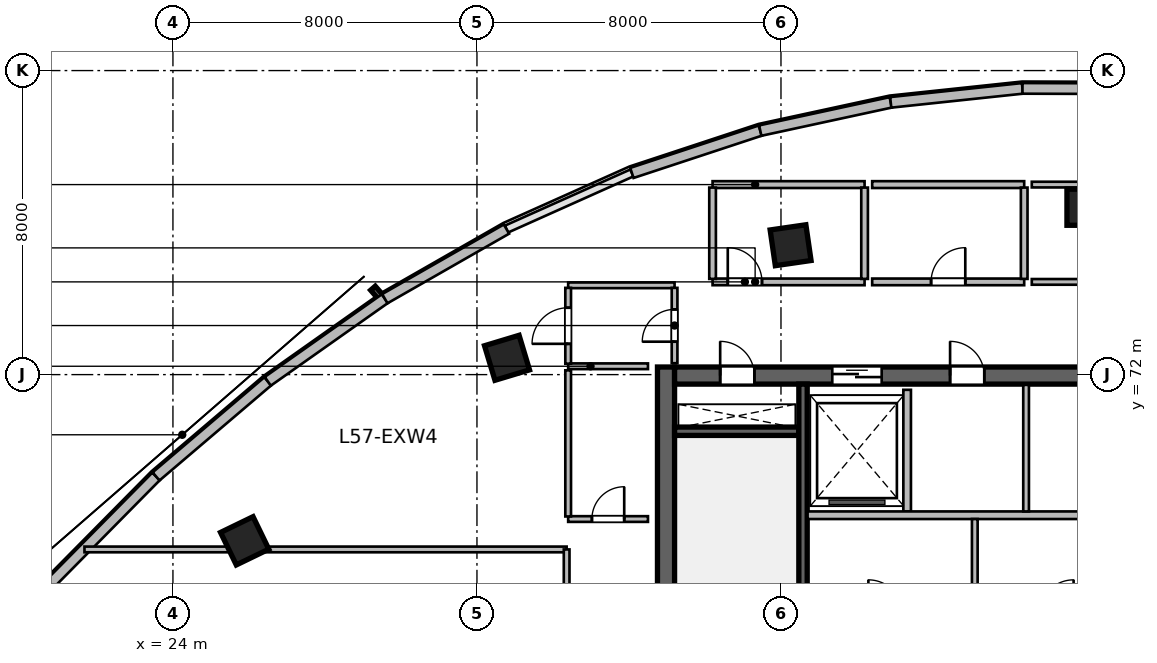
"""IFC4 building model, lengths in metres.
Left out: names, types, materials, properties, quantities, classifications, styles, units other than length and angle.
Written with IfcOpenShell. Run it as: python <this file> out.ifc"""

import sys

from ifc_helpers import new_model, si_unit, direction, frame, frame_2d, origin, origin_2d, place, context, subcontext, project, spatial, rectangle, extrude, source, transform, mapped, element, fill, save


model = new_model("IFC4")
c1 = context("Model", 3, precision=1e-05, world=origin(), true_north=direction((0.0, 1.0)))
c2 = subcontext(c1, "Body", "Model", "MODEL_VIEW")
j1 = project(units=[si_unit("LENGTHUNIT", "METRE"), si_unit("PLANEANGLEUNIT", "RADIAN")], contexts=[c1])
p1 = place(None, origin())
s1 = spatial("IfcSite", under=j1, at=p1, CompositionType="ELEMENT")
p2 = place(p1, origin())
s2 = spatial("IfcBuilding", under=s1, at=p2, CompositionType="ELEMENT")
p3 = place(p2, frame((0.0, 0.0, 235.2)))
s3 = spatial("IfcBuildingStorey", under=s2, at=p3, CompositionType="ELEMENT", Elevation=235.2)
m1 = source(origin(), c2, "Body", "SweptSolid", [
    extrude(rectangle(XDim=12.0, YDim=0.45, at=frame_2d((6.0, 0.0))), origin(), (0.0, 0.0, 1.0), 3.9),
])
p4 = place(p3, frame((36.975, 60.2, 0.0), z_axis=(0.0, 0.0, 1.0), x_axis=(0.0, 1.0, 0.0)))
e1 = element("IfcWall", 1, at=p4, inside=s3, PredefinedType="SHEAR", context=c2, shape_type="MappedRepresentation", body=[
    mapped(m1, transform((0.0, 0.0, 0.0), scale=1.0)),
])
m2 = source(origin(), c2, "Body", "SweptSolid", [
    extrude(rectangle(XDim=21.6, YDim=0.45, at=frame_2d((10.8, 0.0))), origin(), (0.0, 0.0, 1.0), 3.9),
])
p5 = place(p3, frame((37.2, 71.975, 0.0), z_axis=(0.0, 0.0, 1.0), x_axis=(1.0, 0.0, 0.0)))
e2 = element("IfcWall", 2, at=p5, inside=s3, PredefinedType="SHEAR", context=c2, shape_type="MappedRepresentation", body=[
    mapped(m2, transform((0.0, 0.0, 0.0), scale=1.0)),
])
p6 = place(p5, frame((1.2, 0.0, 0.0)))
e3 = element("IfcOpeningElement", 3, at=p6, cuts=e2, PredefinedType="OPENING", context=c2, shape_type="SweptSolid", body=[
    extrude(rectangle(XDim=0.9, YDim=2.1, at=frame_2d((0.45, 1.05))), frame((0.0, 0.235, 0.0), z_axis=(0.0, -1.0, 0.0), x_axis=(1.0, 0.0, 0.0)), (0.0, 0.0, 1.0), 0.47),
])
p7 = place(p5, frame((14.7, 0.0, 0.0)))
e4 = element("IfcOpeningElement", 4, at=p7, cuts=e2, PredefinedType="OPENING", context=c2, shape_type="SweptSolid", body=[
    extrude(rectangle(XDim=1.2, YDim=2.15, at=frame_2d((0.6, 1.075))), frame((0.0, 0.235, 0.0), z_axis=(0.0, -1.0, 0.0), x_axis=(1.0, 0.0, 0.0)), (0.0, 0.0, 1.0), 0.47),
])
p8 = place(p5, frame((4.15, 0.0, 0.0)))
e5 = element("IfcOpeningElement", 5, at=p8, cuts=e2, PredefinedType="OPENING", context=c2, shape_type="SweptSolid", body=[
    extrude(rectangle(XDim=1.3, YDim=2.15, at=frame_2d((0.65, 1.075))), frame((0.0, 0.235, 0.0), z_axis=(0.0, -1.0, 0.0), x_axis=(1.0, 0.0, 0.0)), (0.0, 0.0, 1.0), 0.47),
])
p9 = place(p5, frame((7.25, 0.0, 0.0)))
e6 = element("IfcOpeningElement", 6, at=p9, cuts=e2, PredefinedType="OPENING", context=c2, shape_type="SweptSolid", body=[
    extrude(rectangle(XDim=0.9, YDim=2.1, at=frame_2d((0.45, 1.05))), frame((0.0, 0.235, 0.0), z_axis=(0.0, -1.0, 0.0), x_axis=(1.0, 0.0, 0.0)), (0.0, 0.0, 1.0), 0.47),
])
p10 = place(p5, frame((10.95, 0.0, 0.0)))
e7 = element("IfcOpeningElement", 7, at=p10, cuts=e2, PredefinedType="OPENING", context=c2, shape_type="SweptSolid", body=[
    extrude(rectangle(XDim=0.9, YDim=2.1, at=frame_2d((0.45, 1.05))), frame((0.0, 0.235, 0.0), z_axis=(0.0, -1.0, 0.0), x_axis=(1.0, 0.0, 0.0)), (0.0, 0.0, 1.0), 0.47),
])
m3 = source(origin(), c2, "Body", "SweptSolid", [
    extrude(rectangle(XDim=3.27, YDim=0.22, at=frame_2d((1.635, 0.0))), origin(), (0.0, 0.0, 1.0), 3.9),
])
p11 = place(p3, frame((37.2, 70.51, 0.0), z_axis=(0.0, 0.0, 1.0), x_axis=(1.0, 0.0, 0.0)))
e8 = element("IfcWall", 8, at=p11, inside=s3, PredefinedType="SHEAR", context=c2, shape_type="MappedRepresentation", body=[
    mapped(m3, transform((0.0, 0.0, 0.0), scale=1.0)),
])
m4 = source(origin(), c2, "Body", "SweptSolid", [
    extrude(rectangle(XDim=11.1, YDim=0.22, at=frame_2d((5.55, 0.0))), origin(), (0.0, 0.0, 1.0), 3.9),
])
p12 = place(p3, frame((40.58, 60.65, 0.0), z_axis=(0.0, 0.0, 1.0), x_axis=(0.0, 1.0, 0.0)))
e9 = element("IfcWall", 9, at=p12, inside=s3, PredefinedType="SHEAR", context=c2, shape_type="MappedRepresentation", body=[
    mapped(m4, transform((0.0, 0.0, 0.0), scale=1.0)),
])
m5 = source(origin(), c2, "Body", "SweptSolid", [
    extrude(rectangle(XDim=0.95, YDim=0.95, at=origin_2d()), origin(), (0.0, 0.0, 1.0), 3.9),
])
for number, where, z_axis, x_axis in (
    (10, (25.888, 67.627, 0.0), (0.0, 0.0, 1.0), (-0.436, 0.9, 0.0)),
    (11, (32.791, 72.442, 0.0), (0.0, 0.0, 1.0), (-0.289, 0.957, 0.0)),
    (12, (40.253, 75.404, 0.0), (0.0, 0.0, 1.0), (-0.143, 0.99, 0.0)),
    (13, (48.0, 76.404, 0.0), (0.0, 0.0, 1.0), (0.0, 1.0, 0.0)),
):
    element("IfcColumn", number, at=place(p3, frame(where, z_axis=z_axis, x_axis=x_axis)), inside=s3, PredefinedType="COLUMN", context=c2, shape_type="MappedRepresentation", body=[
        mapped(m5, transform((0.0, 0.0, 0.0), scale=1.0)),
    ])
m6 = source(origin(), c2, "Body", "SweptSolid", [
    extrude(rectangle(XDim=3.955, YDim=0.28, at=frame_2d((1.978, 0.0))), origin(), (0.0, 0.0, 1.0), 3.65),
])
p13 = place(p3, frame((20.776, 66.507, 0.0), z_axis=(0.0, 0.0, 1.0), x_axis=(0.702710517474, 0.711475880569, 0.0)))
e14 = element("IfcWall", 14, at=p13, inside=s3, PredefinedType="SOLIDWALL", context=c2, shape_type="MappedRepresentation", body=[
    mapped(m6, transform((0.0, 0.0, 0.0), scale=1.0)),
])
m7 = source(origin(), c2, "Body", "SweptSolid", [
    extrude(rectangle(XDim=3.86, YDim=0.28, at=frame_2d((1.93, 0.0))), origin(), (0.0, 0.0, 1.0), 3.65),
])
p14 = place(p3, frame((23.556, 69.321, 0.0), z_axis=(0.0, 0.0, 1.0), x_axis=(0.761497547739, 0.648167790613, 0.0)))
e15 = element("IfcWall", 15, at=p14, inside=s3, PredefinedType="SOLIDWALL", context=c2, shape_type="MappedRepresentation", body=[
    mapped(m7, transform((0.0, 0.0, 0.0), scale=1.0)),
])
m8 = source(origin(), c2, "Body", "SweptSolid", [
    extrude(rectangle(XDim=3.77, YDim=0.28, at=frame_2d((1.885, 0.0))), origin(), (0.0, 0.0, 1.0), 3.65),
])
p15 = place(p3, frame((26.495, 71.823, 0.0), z_axis=(0.0, 0.0, 1.0), x_axis=(0.817001958662, 0.576634892755, 0.0)))
e16 = element("IfcWall", 16, at=p15, inside=s3, PredefinedType="SOLIDWALL", context=c2, shape_type="MappedRepresentation", body=[
    mapped(m8, transform((0.0, 0.0, 0.0), scale=1.0)),
])
m9 = source(origin(), c2, "Body", "SweptSolid", [
    extrude(rectangle(XDim=3.688, YDim=0.28, at=frame_2d((1.844, 0.0))), origin(), (0.0, 0.0, 1.0), 3.65),
])
p16 = place(p3, frame((29.576, 73.998, 0.0), z_axis=(0.0, 0.0, 1.0), x_axis=(0.867929289274, 0.496687778005, 0.0)))
e17 = element("IfcWall", 17, at=p16, inside=s3, PredefinedType="SOLIDWALL", context=c2, shape_type="MappedRepresentation", body=[
    mapped(m9, transform((0.0, 0.0, 0.0), scale=1.0)),
])
m10 = source(origin(), c2, "Body", "SweptSolid", [
    extrude(rectangle(XDim=3.557, YDim=0.28, at=frame_2d((1.778, 0.0))), origin(), (0.0, 0.0, 1.0), 3.65),
])
p17 = place(p3, frame((36.077, 77.307, 0.0), z_axis=(0.0, 0.0, 1.0), x_axis=(0.949687460385, 0.31319918197, 0.0)))
e18 = element("IfcWall", 18, at=p17, inside=s3, PredefinedType="SOLIDWALL", context=c2, shape_type="MappedRepresentation", body=[
    mapped(m10, transform((0.0, 0.0, 0.0), scale=1.0)),
])
m11 = source(origin(), c2, "Body", "SweptSolid", [
    extrude(rectangle(XDim=3.513, YDim=0.28, at=frame_2d((1.756, 0.0))), origin(), (0.0, 0.0, 1.0), 3.65),
])
p18 = place(p3, frame((39.455, 78.421, 0.0), z_axis=(0.0, 0.0, 1.0), x_axis=(0.977366029072, 0.211555300611, 0.0)))
e19 = element("IfcWall", 19, at=p18, inside=s3, PredefinedType="SOLIDWALL", context=c2, shape_type="MappedRepresentation", body=[
    mapped(m11, transform((0.0, 0.0, 0.0), scale=1.0)),
])
m12 = source(origin(), c2, "Body", "SweptSolid", [
    extrude(rectangle(XDim=3.486, YDim=0.28, at=frame_2d((1.743, 0.0))), origin(), (0.0, 0.0, 1.0), 3.65),
])
p19 = place(p3, frame((42.888, 79.164, 0.0), z_axis=(0.0, 0.0, 1.0), x_axis=(0.994423029828, 0.105464864994, 0.0)))
e20 = element("IfcWall", 20, at=p19, inside=s3, PredefinedType="SOLIDWALL", context=c2, shape_type="MappedRepresentation", body=[
    mapped(m12, transform((0.0, 0.0, 0.0), scale=1.0)),
])
m13 = source(origin(), c2, "Body", "SweptSolid", [
    extrude(rectangle(XDim=3.477, YDim=0.28, at=frame_2d((1.739, 0.0))), origin(), (0.0, 0.0, 1.0), 3.65),
])
p20 = place(p3, frame((46.355, 79.531, 0.0), z_axis=(0.0, 0.0, 1.0), x_axis=(0.999995652268, -0.002948804142, 0.0)))
e21 = element("IfcWall", 21, at=p20, inside=s3, PredefinedType="SOLIDWALL", context=c2, shape_type="MappedRepresentation", body=[
    mapped(m13, transform((0.0, 0.0, 0.0), scale=1.0)),
])
m14 = source(origin(), c2, "Body", "SweptSolid", [
    extrude(rectangle(XDim=3.2, YDim=0.2, at=frame_2d((1.6, 0.0))), origin(), (0.0, 0.0, 1.0), 3.65),
])
p21 = place(p3, frame((43.32, 68.4, 0.0), z_axis=(0.0, 0.0, 1.0), x_axis=(0.0, 1.0, 0.0)))
e22 = element("IfcWall", 22, at=p21, inside=s3, PredefinedType="SOLIDWALL", context=c2, shape_type="MappedRepresentation", body=[
    mapped(m14, transform((0.0, 0.0, 0.0), scale=1.0)),
])
m15 = source(origin(), c2, "Body", "SweptSolid", [
    extrude(rectangle(XDim=8.8, YDim=0.2, at=frame_2d((4.4, 0.0))), origin(), (0.0, 0.0, 1.0), 3.65),
])
p22 = place(p3, frame((40.7, 68.3, 0.0), z_axis=(0.0, 0.0, 1.0), x_axis=(1.0, 0.0, 0.0)))
e23 = element("IfcWall", 23, at=p22, inside=s3, PredefinedType="SOLIDWALL", context=c2, shape_type="MappedRepresentation", body=[
    mapped(m15, transform((0.0, 0.0, 0.0), scale=1.0)),
])
m16 = source(origin(), c2, "Body", "SweptSolid", [
    extrude(rectangle(XDim=3.33, YDim=0.15, at=frame_2d((1.665, 0.0))), origin(), (0.0, 0.0, 1.0), 3.65),
])
p23 = place(p3, frame((46.45, 68.4, 0.0), z_axis=(0.0, 0.0, 1.0), x_axis=(0.0, 1.0, 0.0)))
e24 = element("IfcWall", 24, at=p23, inside=s3, PredefinedType="PARTITIONING", context=c2, shape_type="MappedRepresentation", body=[
    mapped(m16, transform((0.0, 0.0, 0.0), scale=1.0)),
])
m17 = source(origin(), c2, "Body", "SweptSolid", [
    extrude(rectangle(XDim=2.4, YDim=0.15, at=frame_2d((1.2, 0.0))), origin(), (0.0, 0.0, 1.0), 3.65),
])
p24 = place(p3, frame((45.1, 65.8, 0.0), z_axis=(0.0, 0.0, 1.0), x_axis=(0.0, 1.0, 0.0)))
e25 = element("IfcWall", 25, at=p24, inside=s3, PredefinedType="PARTITIONING", context=c2, shape_type="MappedRepresentation", body=[
    mapped(m17, transform((0.0, 0.0, 0.0), scale=1.0)),
])
m18 = source(origin(), c2, "Body", "SweptSolid", [
    extrude(rectangle(XDim=2.1, YDim=0.15, at=frame_2d((1.05, 0.0))), origin(), (0.0, 0.0, 1.0), 3.65),
])
p25 = place(p3, frame((34.4, 72.22, 0.0), z_axis=(0.0, 0.0, 1.0), x_axis=(1.0, 0.0, 0.0)))
e26 = element("IfcWall", 26, at=p25, inside=s3, PredefinedType="PARTITIONING", context=c2, shape_type="MappedRepresentation", body=[
    mapped(m18, transform((0.0, 0.0, 0.0), scale=1.0)),
])
m19 = source(origin(), c2, "Body", "SweptSolid", [
    extrude(rectangle(XDim=2.8, YDim=0.15, at=frame_2d((1.4, 0.0))), origin(), (0.0, 0.0, 1.0), 3.65),
])
p26 = place(p3, frame((34.4, 74.35, 0.0), z_axis=(0.0, 0.0, 1.0), x_axis=(1.0, 0.0, 0.0)))
e27 = element("IfcWall", 27, at=p26, inside=s3, PredefinedType="PARTITIONING", context=c2, shape_type="MappedRepresentation", body=[
    mapped(m19, transform((0.0, 0.0, 0.0), scale=1.0)),
])
m20 = source(origin(), c2, "Body", "SweptSolid", [
    extrude(rectangle(XDim=1.995, YDim=0.15, at=frame_2d((0.998, 0.0))), origin(), (0.0, 0.0, 1.0), 3.65),
])
p27 = place(p3, frame((34.4, 72.288, 0.0), z_axis=(0.0, 0.0, 1.0), x_axis=(0.0, 1.0, 0.0)))
e28 = element("IfcWall", 28, at=p27, inside=s3, PredefinedType="PARTITIONING", context=c2, shape_type="MappedRepresentation", body=[
    mapped(m20, transform((0.0, 0.0, 0.0), scale=1.0)),
])
p28 = place(p27, frame((0.522, 0.0, 0.0)))
e29 = element("IfcOpeningElement", 29, at=p28, cuts=e28, PredefinedType="OPENING", context=c2, shape_type="SweptSolid", body=[
    extrude(rectangle(XDim=0.95, YDim=2.1, at=frame_2d((0.475, 1.05))), frame((0.0, 0.085, 0.0), z_axis=(0.0, -1.0, 0.0), x_axis=(1.0, 0.0, 0.0)), (0.0, 0.0, 1.0), 0.17),
])
m21 = source(origin(), c2, "Body", "SweptSolid", [
    extrude(rectangle(XDim=1.982, YDim=0.15, at=frame_2d((0.991, 0.0))), origin(), (0.0, 0.0, 1.0), 3.65),
])
p29 = place(p3, frame((37.2, 72.3, 0.0), z_axis=(0.0, 0.0, 1.0), x_axis=(0.0, 1.0, 0.0)))
e30 = element("IfcWall", 30, at=p29, inside=s3, PredefinedType="PARTITIONING", context=c2, shape_type="MappedRepresentation", body=[
    mapped(m21, transform((0.0, 0.0, 0.0), scale=1.0)),
])
p30 = place(p29, frame((0.566, 0.0, 0.0)))
e31 = element("IfcOpeningElement", 31, at=p30, cuts=e30, PredefinedType="OPENING", context=c2, shape_type="SweptSolid", body=[
    extrude(rectangle(XDim=0.85, YDim=2.1, at=frame_2d((0.425, 1.05))), frame((0.0, 0.085, 0.0), z_axis=(0.0, -1.0, 0.0), x_axis=(1.0, 0.0, 0.0)), (0.0, 0.0, 1.0), 0.17),
])
p31 = place(p3, frame((34.4, 68.2, 0.0), z_axis=(0.0, 0.0, 1.0), x_axis=(1.0, 0.0, 0.0)))
e32 = element("IfcWall", 32, at=p31, inside=s3, PredefinedType="PARTITIONING", context=c2, shape_type="MappedRepresentation", body=[
    mapped(m18, transform((0.0, 0.0, 0.0), scale=1.0)),
])
p32 = place(p31, frame((0.625, 0.0, 0.0)))
e33 = element("IfcOpeningElement", 33, at=p32, cuts=e32, PredefinedType="OPENING", context=c2, shape_type="SweptSolid", body=[
    extrude(rectangle(XDim=0.85, YDim=2.1, at=frame_2d((0.425, 1.05))), frame((0.0, 0.085, 0.0), z_axis=(0.0, -1.0, 0.0), x_axis=(1.0, 0.0, 0.0)), (0.0, 0.0, 1.0), 0.17),
])
m22 = source(origin(), c2, "Body", "SweptSolid", [
    extrude(rectangle(XDim=3.845, YDim=0.15, at=frame_2d((1.922, 0.0))), origin(), (0.0, 0.0, 1.0), 3.65),
])
p33 = place(p3, frame((34.4, 68.268, 0.0), z_axis=(0.0, 0.0, 1.0), x_axis=(0.0, 1.0, 0.0)))
e34 = element("IfcWall", 34, at=p33, inside=s3, PredefinedType="PARTITIONING", context=c2, shape_type="MappedRepresentation", body=[
    mapped(m22, transform((0.0, 0.0, 0.0), scale=1.0)),
])
m23 = source(origin(), c2, "Body", "SweptSolid", [
    extrude(rectangle(XDim=4.0, YDim=0.175, at=frame_2d((2.0, 0.0))), origin(), (0.0, 0.0, 1.0), 3.65),
])
p34 = place(p3, frame((38.2, 74.44, 0.0), z_axis=(0.0, 0.0, 1.0), x_axis=(1.0, 0.0, 0.0)))
e35 = element("IfcWall", 35, at=p34, inside=s3, PredefinedType="PARTITIONING", context=c2, shape_type="MappedRepresentation", body=[
    mapped(m23, transform((0.0, 0.0, 0.0), scale=1.0)),
])
p35 = place(p34, frame((0.4, 0.0, 0.0)))
e36 = element("IfcOpeningElement", 36, at=p35, cuts=e35, PredefinedType="OPENING", context=c2, shape_type="SweptSolid", body=[
    extrude(rectangle(XDim=0.9, YDim=2.08, at=frame_2d((0.45, 1.04))), frame((0.0, 0.098, 0.0), z_axis=(0.0, -1.0, 0.0), x_axis=(1.0, 0.0, 0.0)), (0.0, 0.0, 1.0), 0.195),
])
m24 = source(origin(), c2, "Body", "SweptSolid", [
    extrude(rectangle(XDim=4.0, YDim=0.18, at=frame_2d((2.0, 0.0))), origin(), (0.0, 0.0, 1.0), 3.65),
])
p36 = place(p3, frame((38.2, 77.0, 0.0), z_axis=(0.0, 0.0, 1.0), x_axis=(1.0, 0.0, 0.0)))
e37 = element("IfcWall", 37, at=p36, inside=s3, PredefinedType="PLUMBINGWALL", context=c2, shape_type="MappedRepresentation", body=[
    mapped(m24, transform((0.0, 0.0, 0.0), scale=1.0)),
])
m25 = source(origin(), c2, "Body", "SweptSolid", [
    extrude(rectangle(XDim=2.403, YDim=0.175, at=frame_2d((1.201, 0.0))), origin(), (0.0, 0.0, 1.0), 3.65),
])
for number, where, z_axis, x_axis in (
    (38, (38.2, 74.519, 0.0), (0.0, 0.0, 1.0), (0.0, 1.0, 0.0)),
    (39, (42.2, 74.519, 0.0), (0.0, 0.0, 1.0), (0.0, 1.0, 0.0)),
):
    element("IfcWall", number, at=place(p3, frame(where, z_axis=z_axis, x_axis=x_axis)), inside=s3, PredefinedType="PARTITIONING", context=c2, shape_type="MappedRepresentation", body=[
        mapped(m25, transform((0.0, 0.0, 0.0), scale=1.0)),
    ])
p37 = place(p3, frame((42.4, 74.44, 0.0), z_axis=(0.0, 0.0, 1.0), x_axis=(1.0, 0.0, 0.0)))
e40 = element("IfcWall", 40, at=p37, inside=s3, PredefinedType="PARTITIONING", context=c2, shape_type="MappedRepresentation", body=[
    mapped(m23, transform((0.0, 0.0, 0.0), scale=1.0)),
])
p38 = place(p37, frame((1.55, 0.0, 0.0)))
e41 = element("IfcOpeningElement", 41, at=p38, cuts=e40, PredefinedType="OPENING", context=c2, shape_type="SweptSolid", body=[
    extrude(rectangle(XDim=0.9, YDim=2.08, at=frame_2d((0.45, 1.04))), frame((0.0, 0.098, 0.0), z_axis=(0.0, -1.0, 0.0), x_axis=(1.0, 0.0, 0.0)), (0.0, 0.0, 1.0), 0.195),
])
p39 = place(p3, frame((42.4, 77.0, 0.0), z_axis=(0.0, 0.0, 1.0), x_axis=(1.0, 0.0, 0.0)))
e42 = element("IfcWall", 42, at=p39, inside=s3, PredefinedType="PLUMBINGWALL", context=c2, shape_type="MappedRepresentation", body=[
    mapped(m24, transform((0.0, 0.0, 0.0), scale=1.0)),
])
p40 = place(p3, frame((46.4, 74.519, 0.0), z_axis=(0.0, 0.0, 1.0), x_axis=(0.0, 1.0, 0.0)))
e43 = element("IfcWall", 43, at=p40, inside=s3, PredefinedType="PARTITIONING", context=c2, shape_type="MappedRepresentation", body=[
    mapped(m25, transform((0.0, 0.0, 0.0), scale=1.0)),
])
m26 = source(origin(), c2, "Body", "SweptSolid", [
    extrude(rectangle(XDim=4.4, YDim=0.15, at=frame_2d((2.2, 0.0))), origin(), (0.0, 0.0, 1.0), 3.65),
])
p41 = place(p3, frame((46.6, 74.44, 0.0), z_axis=(0.0, 0.0, 1.0), x_axis=(1.0, 0.0, 0.0)))
e44 = element("IfcWall", 44, at=p41, inside=s3, PredefinedType="PARTITIONING", context=c2, shape_type="MappedRepresentation", body=[
    mapped(m26, transform((0.0, 0.0, 0.0), scale=1.0)),
])
p42 = place(p41, frame((1.725, 0.0, 0.0)))
e45 = element("IfcOpeningElement", 45, at=p42, cuts=e44, PredefinedType="OPENING", context=c2, shape_type="SweptSolid", body=[
    extrude(rectangle(XDim=0.95, YDim=2.1, at=frame_2d((0.475, 1.05))), frame((0.0, 0.085, 0.0), z_axis=(0.0, -1.0, 0.0), x_axis=(1.0, 0.0, 0.0)), (0.0, 0.0, 1.0), 0.17),
])
p43 = place(p3, frame((46.6, 77.0, 0.0), z_axis=(0.0, 0.0, 1.0), x_axis=(1.0, 0.0, 0.0)))
e46 = element("IfcWall", 46, at=p43, inside=s3, PredefinedType="PARTITIONING", context=c2, shape_type="MappedRepresentation", body=[
    mapped(m26, transform((0.0, 0.0, 0.0), scale=1.0)),
])
m27 = source(origin(), c2, "Body", "SweptSolid", [
    extrude(rectangle(XDim=12.688, YDim=0.15, at=frame_2d((6.344, 0.0))), origin(), (0.0, 0.0, 1.0), 3.65),
])
p44 = place(p3, frame((21.672, 67.4, 0.0), z_axis=(0.0, 0.0, 1.0), x_axis=(1.0, 0.0, 0.0)))
e47 = element("IfcWall", 47, at=p44, inside=s3, PredefinedType="PARTITIONING", context=c2, shape_type="MappedRepresentation", body=[
    mapped(m27, transform((0.0, 0.0, 0.0), scale=1.0)),
])
m28 = source(origin(), c2, "Body", "SweptSolid", [
    extrude(rectangle(XDim=3.2, YDim=0.15, at=frame_2d((1.6, 0.0))), origin(), (0.0, 0.0, 1.0), 3.65),
])
p45 = place(p3, frame((34.36, 64.2, 0.0), z_axis=(0.0, 0.0, 1.0), x_axis=(0.0, 1.0, 0.0)))
e48 = element("IfcWall", 48, at=p45, inside=s3, PredefinedType="PARTITIONING", context=c2, shape_type="MappedRepresentation", body=[
    mapped(m28, transform((0.0, 0.0, 0.0), scale=1.0)),
])
p46 = place(p45, frame((1.125, 0.0, 0.0)))
e49 = element("IfcOpeningElement", 49, at=p46, cuts=e48, PredefinedType="OPENING", context=c2, shape_type="SweptSolid", body=[
    extrude(rectangle(XDim=0.95, YDim=2.1, at=frame_2d((0.475, 1.05))), frame((0.0, 0.085, 0.0), z_axis=(0.0, -1.0, 0.0), x_axis=(1.0, 0.0, 0.0)), (0.0, 0.0, 1.0), 0.17),
])
m29 = source(origin(), c2, "Body", "SweptSolid", [
    extrude(rectangle(XDim=0.9, YDim=2.1, at=frame_2d((0.45, 1.05))), frame((0.0, 0.025, 0.0), z_axis=(0.0, -1.0, 0.0), x_axis=(1.0, 0.0, 0.0)), (0.0, 0.0, 1.0), 0.05),
])
p47 = place(p6, origin())
e50 = element("IfcDoor", 50, at=p47, inside=s3, OperationType="SINGLE_SWING_LEFT", PredefinedType="DOOR", context=c2, shape_type="MappedRepresentation", body=[
    mapped(m29, transform((0.0, 0.0, 0.0), scale=1.0)),
])
fill(e3, e50)
m30 = source(origin(), c2, "Body", "SweptSolid", [
    extrude(rectangle(XDim=1.3, YDim=2.15, at=frame_2d((0.65, 1.075))), frame((0.0, 0.025, 0.0), z_axis=(0.0, -1.0, 0.0), x_axis=(1.0, 0.0, 0.0)), (0.0, 0.0, 1.0), 0.05),
])
p48 = place(p8, origin())
e51 = element("IfcDoor", 51, at=p48, inside=s3, OperationType="DOUBLE_DOOR_SLIDING", PredefinedType="DOOR", context=c2, shape_type="MappedRepresentation", body=[
    mapped(m30, transform((0.0, 0.0, 0.0), scale=1.0)),
])
fill(e5, e51)
p49 = place(p9, origin())
e52 = element("IfcDoor", 52, at=p49, inside=s3, OperationType="SINGLE_SWING_LEFT", PredefinedType="DOOR", context=c2, shape_type="MappedRepresentation", body=[
    mapped(m29, transform((0.0, 0.0, 0.0), scale=1.0)),
])
fill(e6, e52)
m31 = source(origin(), c2, "Body", "SweptSolid", [
    extrude(rectangle(XDim=0.85, YDim=2.1, at=frame_2d((0.425, 1.05))), frame((0.0, 0.025, 0.0), z_axis=(0.0, -1.0, 0.0), x_axis=(1.0, 0.0, 0.0)), (0.0, 0.0, 1.0), 0.05),
])
p50 = place(p30, origin())
e53 = element("IfcDoor", 53, at=p50, inside=s3, OperationType="SINGLE_SWING_LEFT", PredefinedType="DOOR", context=c2, shape_type="MappedRepresentation", body=[
    mapped(m31, transform((0.0, 0.0, 0.0), scale=1.0)),
])
fill(e31, e53)
p51 = place(p32, origin())
e54 = element("IfcDoor", 54, at=p51, inside=s3, OperationType="SINGLE_SWING_RIGHT", PredefinedType="DOOR", context=c2, shape_type="MappedRepresentation", body=[
    mapped(m31, transform((0.0, 0.0, 0.0), scale=1.0)),
])
fill(e33, e54)
m32 = source(origin(), c2, "Body", "SweptSolid", [
    extrude(rectangle(XDim=0.9, YDim=2.08, at=frame_2d((0.45, 1.04))), frame((0.0, 0.025, 0.0), z_axis=(0.0, -1.0, 0.0), x_axis=(1.0, 0.0, 0.0)), (0.0, 0.0, 1.0), 0.05),
])
p52 = place(p35, origin())
e55 = element("IfcDoor", 55, at=p52, inside=s3, OperationType="SINGLE_SWING_LEFT", PredefinedType="DOOR", context=c2, shape_type="MappedRepresentation", body=[
    mapped(m32, transform((0.0, 0.0, 0.0), scale=1.0)),
])
fill(e36, e55)
p53 = place(p38, origin())
e56 = element("IfcDoor", 56, at=p53, inside=s3, OperationType="SINGLE_SWING_RIGHT", PredefinedType="DOOR", context=c2, shape_type="MappedRepresentation", body=[
    mapped(m32, transform((0.0, 0.0, 0.0), scale=1.0)),
])
fill(e41, e56)
m33 = source(origin(), c2, "Body", "SweptSolid", [
    extrude(rectangle(XDim=0.95, YDim=2.1, at=frame_2d((0.475, 1.05))), frame((0.0, 0.025, 0.0), z_axis=(0.0, -1.0, 0.0), x_axis=(1.0, 0.0, 0.0)), (0.0, 0.0, 1.0), 0.05),
])
p54 = place(p28, origin())
e57 = element("IfcDoor", 57, at=p54, inside=s3, OperationType="SINGLE_SWING_LEFT", PredefinedType="DOOR", context=c2, shape_type="MappedRepresentation", body=[
    mapped(m33, transform((0.0, 0.0, 0.0), scale=1.0)),
])
fill(e29, e57)
save(model, sys.argv[1])
